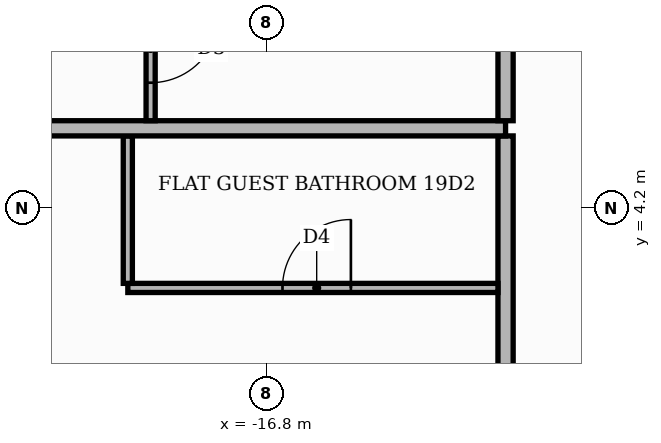
"""IFC4 building model, lengths in metres.
Left out: names, types, materials, properties, quantities, classifications, styles, units other than length and angle.
Written with IfcOpenShell. Run it as: python <this file> out.ifc"""

import sys

from ifc_helpers import new_model, si_unit, direction, frame, frame_2d, origin, place, context, subcontext, project, spatial, rectangle, extrude, element, fill, save


model = new_model("IFC4")
c1 = context("Model", 3, precision=1e-05, world=origin(), true_north=direction((0.0, 1.0)))
c2 = subcontext(c1, "Body", "Model", "MODEL_VIEW")
j1 = project(units=[si_unit("LENGTHUNIT", "METRE"), si_unit("PLANEANGLEUNIT", "RADIAN")], contexts=[c1])
p1 = place(None, origin())
s1 = spatial("IfcSite", under=j1, at=p1, CompositionType="ELEMENT")
p2 = place(p1, origin())
s2 = spatial("IfcBuilding", under=s1, at=p2, CompositionType="ELEMENT")
p3 = place(p2, frame((0.0, 0.0, 83.1)))
s3 = spatial("IfcBuildingStorey", under=s2, at=p3, CompositionType="ELEMENT", Elevation=83.1)
p4 = place(p3, frame((-13.65, -13.55, 0.0), z_axis=(0.0, 0.0, 1.0), x_axis=(0.0, 1.0, 0.0)))
e1 = element("IfcWall", 1, at=p4, inside=s3, PredefinedType="PARTITIONING", context=c2, shape_type="SweptSolid", body=[
    extrude(rectangle(XDim=18.7, YDim=0.2, at=frame_2d((9.35, 0.0))), origin(), (0.0, 0.0, 1.0), 3.48),
])
p5 = place(p4, frame((14.05, 0.0, 0.0)))
e2 = element("IfcOpeningElement", 2, at=p5, cuts=e1, PredefinedType="OPENING", context=c2, shape_type="SweptSolid", body=[
    extrude(rectangle(XDim=1.1, YDim=2.4, at=frame_2d((0.55, 1.2))), frame((0.0, 0.11, 0.0), z_axis=(0.0, -1.0, 0.0), x_axis=(1.0, 0.0, 0.0)), (0.0, 0.0, 1.0), 0.22),
])
p6 = place(p3, frame((-18.62, 3.15, 0.0), z_axis=(0.0, 0.0, 1.0), x_axis=(1.0, 0.0, 0.0)))
e3 = element("IfcWall", 3, at=p6, inside=s3, PredefinedType="PARTITIONING", context=c2, shape_type="SweptSolid", body=[
    extrude(rectangle(XDim=4.87, YDim=0.12, at=frame_2d((2.435, 0.0))), origin(), (0.0, 0.0, 1.0), 3.48),
])
p7 = place(p6, frame((2.035, 0.0, 0.0)))
e4 = element("IfcOpeningElement", 4, at=p7, cuts=e3, PredefinedType="OPENING", context=c2, shape_type="SweptSolid", body=[
    extrude(rectangle(XDim=0.9, YDim=2.1, at=frame_2d((0.45, 1.05))), frame((0.0, 0.07, 0.0), z_axis=(0.0, -1.0, 0.0), x_axis=(1.0, 0.0, 0.0)), (0.0, 0.0, 1.0), 0.14),
])
p8 = place(p3, frame((-18.62, 3.21, 0.0), z_axis=(0.0, 0.0, 1.0), x_axis=(0.0, 1.0, 0.0)))
e5 = element("IfcWall", 5, at=p8, inside=s3, PredefinedType="PARTITIONING", context=c2, shape_type="SweptSolid", body=[
    extrude(rectangle(XDim=1.94, YDim=0.12, at=frame_2d((0.97, 0.0))), origin(), (0.0, 0.0, 1.0), 3.48),
])
p9 = place(p3, frame((-25.42, 5.25, 0.0), z_axis=(0.0, 0.0, 1.0), x_axis=(1.0, 0.0, 0.0)))
e6 = element("IfcWall", 6, at=p9, inside=s3, PredefinedType="PARTITIONING", context=c2, shape_type="SweptSolid", body=[
    extrude(rectangle(XDim=11.77, YDim=0.2, at=frame_2d((5.885, 0.0))), origin(), (0.0, 0.0, 1.0), 3.48),
])
p10 = place(p3, frame((-18.32, 5.35, 0.0), z_axis=(0.0, 0.0, 1.0), x_axis=(0.0, 1.0, 0.0)))
e7 = element("IfcWall", 7, at=p10, inside=s3, PredefinedType="PARTITIONING", context=c2, shape_type="SweptSolid", body=[
    extrude(rectangle(XDim=1.94, YDim=0.12, at=frame_2d((0.97, 0.0))), origin(), (0.0, 0.0, 1.0), 3.48),
])
p11 = place(p10, frame((0.5, 0.0, 0.0)))
e8 = element("IfcOpeningElement", 8, at=p11, cuts=e7, PredefinedType="OPENING", context=c2, shape_type="SweptSolid", body=[
    extrude(rectangle(XDim=0.9, YDim=2.1, at=frame_2d((0.45, 1.05))), frame((0.0, 0.07, 0.0), z_axis=(0.0, -1.0, 0.0), x_axis=(1.0, 0.0, 0.0)), (0.0, 0.0, 1.0), 0.14),
])
p12 = place(p3, frame((-13.65, 5.35, 0.0), z_axis=(0.0, 0.0, 1.0), x_axis=(0.0, 1.0, 0.0)))
e9 = element("IfcWall", 9, at=p12, inside=s3, PredefinedType="PARTITIONING", context=c2, shape_type="SweptSolid", body=[
    extrude(rectangle(XDim=8.2, YDim=0.2, at=frame_2d((4.1, 0.0))), origin(), (0.0, 0.0, 1.0), 3.48),
])
p13 = place(p12, frame((5.65, 0.0, 0.0)))
e10 = element("IfcOpeningElement", 10, at=p13, cuts=e9, PredefinedType="OPENING", context=c2, shape_type="SweptSolid", body=[
    extrude(rectangle(XDim=1.1, YDim=2.4, at=frame_2d((0.55, 1.2))), frame((0.0, 0.11, 0.0), z_axis=(0.0, -1.0, 0.0), x_axis=(1.0, 0.0, 0.0)), (0.0, 0.0, 1.0), 0.22),
])
p14 = place(p11, frame((0.9, 0.0, 0.0), z_axis=(0.0, 0.0, 1.0), x_axis=(-1.0, 0.0, 0.0)))
e11 = element("IfcDoor", 11, at=p14, inside=s3, OperationType="SINGLE_SWING_RIGHT", PredefinedType="DOOR", context=c2, shape_type="SweptSolid", body=[
    extrude(rectangle(XDim=0.9, YDim=2.1, at=frame_2d((0.45, 1.05))), frame((0.0, 0.025, 0.0), z_axis=(0.0, -1.0, 0.0), x_axis=(1.0, 0.0, 0.0)), (0.0, 0.0, 1.0), 0.05),
])
fill(e8, e11)
p15 = place(p7, origin())
e12 = element("IfcDoor", 12, at=p15, inside=s3, OperationType="SINGLE_SWING_RIGHT", PredefinedType="DOOR", context=c2, shape_type="SweptSolid", body=[
    extrude(rectangle(XDim=0.9, YDim=2.1, at=frame_2d((0.45, 1.05))), frame((0.0, 0.025, 0.0), z_axis=(0.0, -1.0, 0.0), x_axis=(1.0, 0.0, 0.0)), (0.0, 0.0, 1.0), 0.05),
])
fill(e4, e12)
save(model, sys.argv[1])
